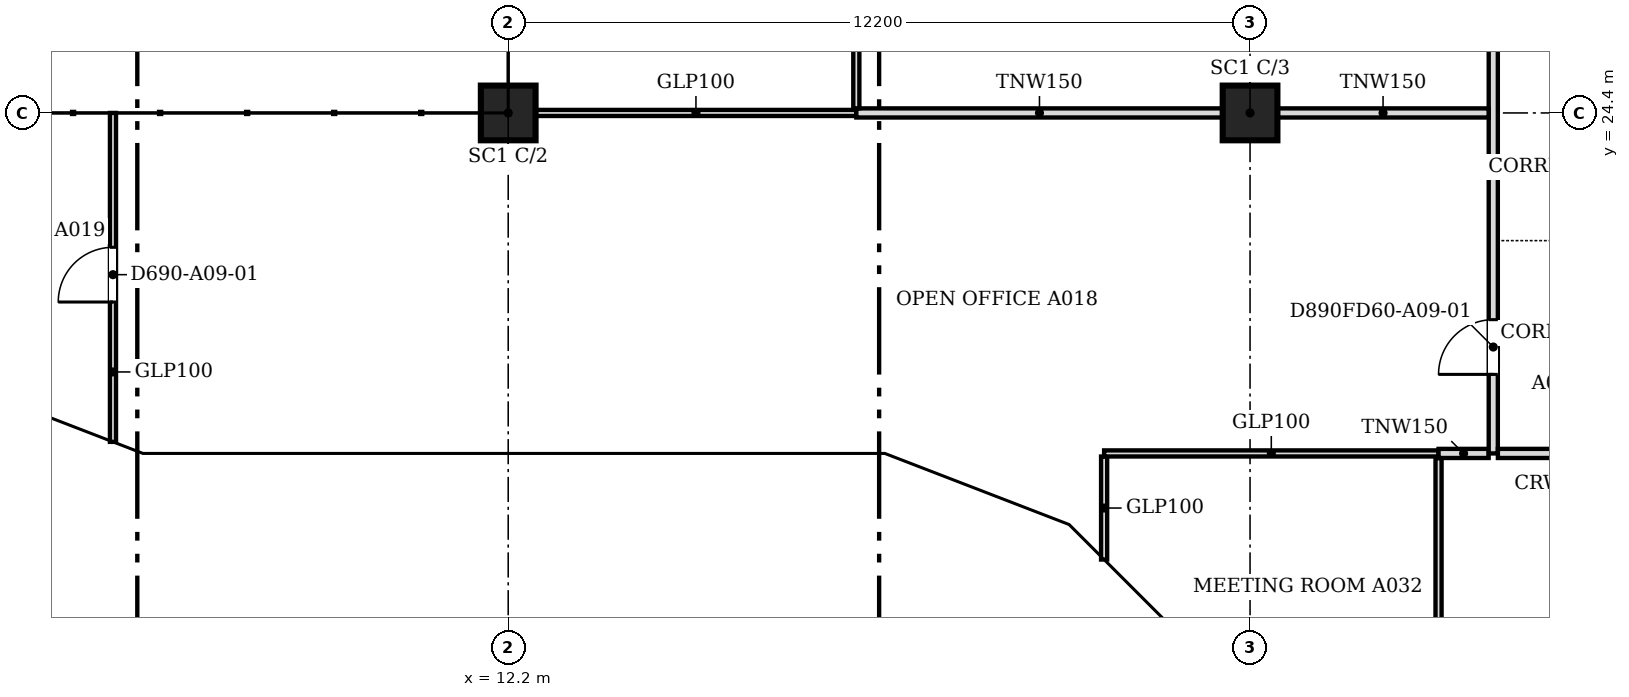
"""IFC4 building model, lengths in metres.
Left out: names, types, materials, properties, quantities, classifications, styles, units other than length and angle.
Written with IfcOpenShell. Run it as: python <this file> out.ifc"""

import sys

from ifc_helpers import new_model, si_unit, direction, frame, frame_2d, origin, origin_2d, place, context, subcontext, project, spatial, polyline, rectangle, outline, extrude, faceted_brep, source, transform, mapped, element, fill, save


model = new_model("IFC4")
c1 = context("Model", 3, precision=1e-05, world=origin(), true_north=direction((0.0, 1.0)))
c2 = subcontext(c1, "Body", "Model", "MODEL_VIEW")
j1 = project(units=[si_unit("LENGTHUNIT", "METRE"), si_unit("PLANEANGLEUNIT", "RADIAN")], contexts=[c1])
p1 = place(None, origin())
s1 = spatial("IfcSite", under=j1, at=p1, CompositionType="ELEMENT")
p2 = place(p1, origin())
s2 = spatial("IfcBuilding", under=s1, at=p2, CompositionType="ELEMENT")
p3 = place(p2, frame((0.0, 0.0, 102.8)))
s3 = spatial("IfcBuildingStorey", under=s2, at=p3, CompositionType="ELEMENT", Elevation=102.8)
for number, where, z_axis, x_axis in (
    (1, (12.2, 24.4, 0.0), (0.0, 0.0, 1.0), (1.0, 0.0, 0.0)),
    (2, (24.4, 24.4, 0.0), (0.0, 0.0, 1.0), (1.0, 0.0, 0.0)),
):
    element("IfcColumn", number, at=place(p3, frame(where, z_axis=z_axis, x_axis=x_axis)), inside=s3, PredefinedType="COLUMN", context=c2, shape_type="SweptSolid", body=[
        extrude(rectangle(XDim=0.9, YDim=0.9, at=origin_2d()), origin(), (0.0, 0.0, 1.0), 3.55),
    ])
m1 = source(origin(), c2, "Body", "Brep", [
    faceted_brep([(0.053, -0.25, 0.0), (3.003, -0.25, 3.8), (0.053, -0.25, 7.6), (0.0, -0.25, 7.532), (0.0, -0.25, 0.068), (0.106, 0.25, 7.532), (2.957, 0.25, 3.86), (2.957, 0.25, 3.74), (0.106, 0.25, 0.068), (3.003, 0.0, 3.8), (0.053, 0.0, 0.0), (0.053, 0.0, 7.6)], [[[0, 1, 2, 3, 4]], [[5, 6, 7, 8]], [[8, 7, 9, 1, 0, 10]], [[6, 5, 11, 2, 1, 9]], [[3, 2, 11]], [[10, 0, 4]], [[8, 10, 4, 3, 11, 5]], [[9, 7, 6]]]),
])
p4 = place(p3, frame((3.344, 19.631, -3.8), z_axis=(0.0, 0.0, 1.0), x_axis=(0.933007896601, -0.359855894603, 0.0)))
e3 = element("IfcWall", 3, at=p4, inside=s3, PredefinedType="SOLIDWALL", context=c2, shape_type="MappedRepresentation", body=[
    mapped(m1, transform((0.0, 0.0, 0.0), scale=1.0)),
])
m2 = source(origin(), c2, "Body", "SweptSolid", [
    extrude(outline(polyline([(0.253, 0.665), (2.687, 3.8), (0.253, 6.935), (0.253, 0.665)])), frame((0.0, 0.26, 0.0), z_axis=(0.0, -1.0, 0.0), x_axis=(1.0, 0.0, 0.0)), (0.0, 0.0, 1.0), 0.52),
])
p5 = place(p4, origin())
e4 = element("IfcOpeningElement", 4, at=p5, cuts=e3, PredefinedType="OPENING", context=c2, shape_type="MappedRepresentation", body=[
    mapped(m2, transform((0.0, 0.0, 0.0), scale=1.0)),
])
m3 = source(origin(), c2, "Body", "Brep", [
    faceted_brep([(3.003, -0.25, 0.0), (6.053, -0.25, 3.8), (3.003, -0.25, 7.6), (0.0, -0.25, 3.8), (0.047, 0.25, 3.859), (3.003, 0.25, 7.6), (6.053, 0.25, 3.8), (3.003, 0.25, 0.0), (0.047, 0.25, 3.741), (0.0, 0.0, 3.8)], [[[0, 1, 2, 3]], [[4, 5, 6, 7, 8]], [[7, 6, 1, 0]], [[6, 5, 2, 1]], [[5, 4, 9, 3, 2]], [[8, 7, 0, 3, 9]], [[8, 9, 4]]]),
])
p6 = place(p3, frame((6.146, 18.55, -3.8), z_axis=(0.0, 0.0, 1.0), x_axis=(1.0, 0.0, 0.0)))
e5 = element("IfcWall", 5, at=p6, inside=s3, PredefinedType="SOLIDWALL", context=c2, shape_type="MappedRepresentation", body=[
    mapped(m3, transform((0.0, 0.0, 0.0), scale=1.0)),
])
m4 = source(origin(), c2, "Body", "SweptSolid", [
    extrude(outline(polyline([(3.005, 0.401), (5.733, 3.8), (3.005, 7.199), (0.319, 3.8), (3.005, 0.401)])), frame((0.0, 0.26, 0.0), z_axis=(0.0, -1.0, 0.0), x_axis=(1.0, 0.0, 0.0)), (0.0, 0.0, 1.0), 0.52),
])
p7 = place(p6, origin())
e6 = element("IfcOpeningElement", 6, at=p7, cuts=e5, PredefinedType="OPENING", context=c2, shape_type="MappedRepresentation", body=[
    mapped(m4, transform((0.0, 0.0, 0.0), scale=1.0)),
])
m5 = source(origin(), c2, "Body", "Brep", [
    faceted_brep([(3.05, -0.25, 0.0), (6.1, -0.25, 3.743), (6.1, -0.25, 3.857), (3.05, -0.25, 7.6), (0.0, -0.25, 3.8), (0.0, 0.25, 3.8), (3.05, 0.25, 7.6), (6.146, 0.25, 3.8), (3.05, 0.25, 0.0), (6.146, -0.0, 3.8)], [[[0, 1, 2, 3, 4]], [[5, 6, 7, 8]], [[8, 7, 9, 1, 0]], [[7, 6, 3, 2, 9]], [[6, 5, 4, 3]], [[5, 8, 0, 4]], [[1, 9, 2]]]),
])
p8 = place(p3, frame((12.2, 18.55, -3.8), z_axis=(0.0, 0.0, 1.0), x_axis=(1.0, 0.0, 0.0)))
e7 = element("IfcWall", 7, at=p8, inside=s3, PredefinedType="SOLIDWALL", context=c2, shape_type="MappedRepresentation", body=[
    mapped(m5, transform((0.0, 0.0, 0.0), scale=1.0)),
])
m6 = source(origin(), c2, "Body", "SweptSolid", [
    extrude(outline(polyline([(3.052, 0.397), (5.824, 3.8), (3.052, 7.202), (0.321, 3.8), (3.052, 0.397)])), frame((0.0, 0.26, 0.0), z_axis=(0.0, -1.0, 0.0), x_axis=(1.0, 0.0, 0.0)), (0.0, 0.0, 1.0), 0.52),
])
p9 = place(p8, origin())
e8 = element("IfcOpeningElement", 8, at=p9, cuts=e7, PredefinedType="OPENING", context=c2, shape_type="MappedRepresentation", body=[
    mapped(m6, transform((0.0, 0.0, 0.0), scale=1.0)),
])
m7 = source(origin(), c2, "Body", "Brep", [
    faceted_brep([(3.096, -0.25, 7.536), (0.047, -0.25, 3.856), (0.047, -0.25, 3.744), (3.096, -0.25, 0.064), (0.0, 0.25, 3.8), (3.149, 0.25, 7.6), (3.202, 0.25, 7.536), (3.202, 0.25, 0.064), (3.149, 0.25, 0.0), (3.149, -0.0, 0.0), (3.149, -0.0, 7.6), (0.0, 0.0, 3.8)], [[[0, 1, 2, 3]], [[4, 5, 6, 7, 8]], [[8, 7, 9]], [[6, 5, 10]], [[5, 4, 11, 1, 0, 10]], [[4, 8, 9, 3, 2, 11]], [[11, 2, 1]], [[3, 9, 7, 6, 10, 0]]]),
])
p10 = place(p3, frame((18.346, 18.55, -3.8), z_axis=(0.0, 0.0, 1.0), x_axis=(0.932985567668, -0.359913782069, 0.0)))
e9 = element("IfcWall", 9, at=p10, inside=s3, PredefinedType="SOLIDWALL", context=c2, shape_type="MappedRepresentation", body=[
    mapped(m7, transform((0.0, 0.0, 0.0), scale=1.0)),
])
m8 = source(origin(), c2, "Body", "SweptSolid", [
    extrude(outline(polyline([(2.949, 6.967), (0.325, 3.8), (2.949, 0.633), (2.949, 6.967)])), frame((0.0, 0.26, 0.0), z_axis=(0.0, -1.0, 0.0), x_axis=(1.0, 0.0, 0.0)), (0.0, 0.0, 1.0), 0.52),
])
p11 = place(p10, origin())
e10 = element("IfcOpeningElement", 10, at=p11, cuts=e9, PredefinedType="OPENING", context=c2, shape_type="MappedRepresentation", body=[
    mapped(m8, transform((0.0, 0.0, 0.0), scale=1.0)),
])
m9 = source(origin(), c2, "Body", "Brep", [
    faceted_brep([(0.106, -0.25, 0.064), (3.156, -0.25, 3.736), (3.156, -0.25, 3.864), (0.106, -0.25, 7.536), (0.0, 0.25, 7.536), (0.053, 0.25, 7.6), (3.209, 0.25, 3.8), (0.053, 0.25, 0.0), (0.0, 0.25, 0.064), (3.209, -0.0, 3.8), (0.053, 0.0, 0.0), (0.053, 0.0, 7.6)], [[[0, 1, 2, 3]], [[4, 5, 6, 7, 8]], [[7, 6, 9, 1, 0, 10]], [[6, 5, 11, 3, 2, 9]], [[5, 4, 11]], [[8, 7, 10]], [[8, 10, 0, 3, 11, 4]], [[1, 9, 2]]]),
])
p12 = place(p3, frame((21.248, 17.454, -3.8), z_axis=(0.0, 0.0, 1.0), x_axis=(0.707106781187, -0.707106781187, 0.0)))
e11 = element("IfcWall", 11, at=p12, inside=s3, PredefinedType="SOLIDWALL", context=c2, shape_type="MappedRepresentation", body=[
    mapped(m9, transform((0.0, 0.0, 0.0), scale=1.0)),
])
m10 = source(origin(), c2, "Body", "SweptSolid", [
    extrude(outline(polyline([(0.253, 0.632), (2.884, 3.8), (0.253, 6.968), (0.253, 0.632)])), frame((0.0, 0.26, 0.0), z_axis=(0.0, -1.0, 0.0), x_axis=(1.0, 0.0, 0.0)), (0.0, 0.0, 1.0), 0.52),
])
p13 = place(p12, origin())
e12 = element("IfcOpeningElement", 12, at=p13, cuts=e11, PredefinedType="OPENING", context=c2, shape_type="MappedRepresentation", body=[
    mapped(m10, transform((0.0, 0.0, 0.0), scale=1.0)),
])
m11 = source(origin(), c2, "Body", "Brep", [
    faceted_brep([(2.95, -0.25, 0.0), (2.997, -0.25, 0.059), (2.997, -0.25, 3.8), (0.0, -0.25, 3.8), (0.053, 0.25, 3.8), (2.904, 0.25, 3.8), (2.904, 0.25, 0.06), (0.053, 0.25, 3.732), (2.95, 0.0, 0.0), (0.0, 0.0, 3.8)], [[[0, 1, 2, 3]], [[4, 5, 6, 7]], [[1, 0, 8]], [[5, 4, 9, 3, 2]], [[7, 6, 8, 0, 3, 9]], [[7, 9, 4]], [[1, 8, 6, 5, 2]]]),
])
p14 = place(p3, frame((3.394, 19.612, 0.0), z_axis=(0.0, 0.0, 1.0), x_axis=(0.932990326376, -0.359901446078, 0.0)))
e13 = element("IfcWall", 13, at=p14, inside=s3, PredefinedType="SOLIDWALL", context=c2, shape_type="MappedRepresentation", body=[
    mapped(m11, transform((0.0, 0.0, 0.0), scale=1.0)),
])
m12 = source(origin(), c2, "Body", "SweptSolid", [
    extrude(outline(polyline([(2.75, 3.55), (0.511, 3.55), (2.75, 0.665), (2.75, 3.55)])), frame((0.0, 0.26, 0.0), z_axis=(0.0, -1.0, 0.0), x_axis=(1.0, 0.0, 0.0)), (0.0, 0.0, 1.0), 0.52),
])
p15 = place(p14, origin())
e14 = element("IfcOpeningElement", 14, at=p15, cuts=e13, PredefinedType="OPENING", context=c2, shape_type="MappedRepresentation", body=[
    mapped(m12, transform((0.0, 0.0, 0.0), scale=1.0)),
])
m13 = source(origin(), c2, "Body", "Brep", [
    faceted_brep([(0.047, -0.25, 0.0), (3.05, -0.25, 3.8), (0.0, -0.25, 3.8), (0.0, -0.25, 0.06), (0.093, 0.25, 3.8), (3.05, 0.25, 3.8), (0.093, 0.25, 0.059), (0.047, 0.0, 0.0)], [[[0, 1, 2, 3]], [[4, 5, 6]], [[6, 5, 1, 0, 7]], [[5, 4, 2, 1]], [[7, 0, 3]], [[6, 7, 3, 2, 4]]]),
])
p16 = place(p3, frame((6.1, 18.55, 0.0), z_axis=(0.0, 0.0, 1.0), x_axis=(1.0, 0.0, 0.0)))
e15 = element("IfcWall", 15, at=p16, inside=s3, PredefinedType="SOLIDWALL", context=c2, shape_type="MappedRepresentation", body=[
    mapped(m13, transform((0.0, 0.0, 0.0), scale=1.0)),
])
m14 = source(origin(), c2, "Body", "SweptSolid", [
    extrude(outline(polyline([(0.247, 0.656), (2.534, 3.55), (0.247, 3.55), (0.247, 0.656)])), frame((0.0, 0.26, 0.0), z_axis=(0.0, -1.0, 0.0), x_axis=(1.0, 0.0, 0.0)), (0.0, 0.0, 1.0), 0.52),
])
p17 = place(p16, origin())
e16 = element("IfcOpeningElement", 16, at=p17, cuts=e15, PredefinedType="OPENING", context=c2, shape_type="MappedRepresentation", body=[
    mapped(m14, transform((0.0, 0.0, 0.0), scale=1.0)),
])
m15 = source(origin(), c2, "Body", "SweptSolid", [
    extrude(outline(polyline([(3.05, 0.0), (6.1, 3.8), (0.0, 3.8), (3.05, 0.0)])), frame((0.0, 0.25, 0.0), z_axis=(0.0, -1.0, 0.0), x_axis=(1.0, 0.0, 0.0)), (0.0, 0.0, 1.0), 0.5),
])
p18 = place(p3, frame((9.15, 18.55, 0.0), z_axis=(0.0, 0.0, 1.0), x_axis=(1.0, 0.0, 0.0)))
e17 = element("IfcWall", 17, at=p18, inside=s3, PredefinedType="SOLIDWALL", context=c2, shape_type="MappedRepresentation", body=[
    mapped(m15, transform((0.0, 0.0, 0.0), scale=1.0)),
])
m16 = source(origin(), c2, "Body", "SweptSolid", [
    extrude(outline(polyline([(3.05, 0.399), (5.579, 3.55), (0.521, 3.55), (3.05, 0.399)])), frame((0.0, 0.26, 0.0), z_axis=(0.0, -1.0, 0.0), x_axis=(1.0, 0.0, 0.0)), (0.0, 0.0, 1.0), 0.52),
])
p19 = place(p18, origin())
e18 = element("IfcOpeningElement", 18, at=p19, cuts=e17, PredefinedType="OPENING", context=c2, shape_type="MappedRepresentation", body=[
    mapped(m16, transform((0.0, 0.0, 0.0), scale=1.0)),
])
m17 = source(origin(), c2, "Body", "Brep", [
    faceted_brep([(3.05, -0.25, 3.8), (0.0, -0.25, 3.8), (3.05, -0.25, 0.057), (0.0, 0.25, 3.8), (3.143, 0.25, 3.8), (3.143, 0.25, 0.056), (3.096, 0.25, 0.0), (3.096, -0.0, 0.0)], [[[0, 1, 2]], [[3, 4, 5, 6]], [[6, 5, 7]], [[4, 3, 1, 0]], [[3, 6, 7, 2, 1]], [[2, 7, 5, 4, 0]]]),
])
p20 = place(p3, frame((15.25, 18.55, 0.0), z_axis=(0.0, 0.0, 1.0), x_axis=(1.0, 0.0, 0.0)))
e19 = element("IfcWall", 19, at=p20, inside=s3, PredefinedType="SOLIDWALL", context=c2, shape_type="MappedRepresentation", body=[
    mapped(m17, transform((0.0, 0.0, 0.0), scale=1.0)),
])
m18 = source(origin(), c2, "Body", "SweptSolid", [
    extrude(outline(polyline([(2.896, 3.55), (0.526, 3.55), (2.896, 0.641), (2.896, 3.55)])), frame((0.0, 0.26, 0.0), z_axis=(0.0, -1.0, 0.0), x_axis=(1.0, 0.0, 0.0)), (0.0, 0.0, 1.0), 0.52),
])
p21 = place(p20, origin())
e20 = element("IfcOpeningElement", 20, at=p21, cuts=e19, PredefinedType="OPENING", context=c2, shape_type="MappedRepresentation", body=[
    mapped(m18, transform((0.0, 0.0, 0.0), scale=1.0)),
])
m19 = source(origin(), c2, "Body", "Brep", [
    faceted_brep([(0.093, -0.25, 0.056), (3.143, -0.25, 3.736), (3.143, -0.25, 3.8), (0.093, -0.25, 3.8), (0.0, 0.25, 3.8), (3.196, 0.25, 3.8), (0.047, 0.25, 0.0), (0.0, 0.25, 0.057), (3.196, -0.0, 3.8), (0.047, 0.0, 0.0)], [[[0, 1, 2, 3]], [[4, 5, 6, 7]], [[6, 5, 8, 1, 0, 9]], [[5, 4, 3, 2, 8]], [[7, 6, 9]], [[7, 9, 0, 3, 4]], [[1, 8, 2]]]),
])
p22 = place(p3, frame((18.303, 18.567, 0.0), z_axis=(0.0, 0.0, 1.0), x_axis=(0.932978940178, -0.359930961693, 0.0)))
e21 = element("IfcWall", 21, at=p22, inside=s3, PredefinedType="SOLIDWALL", context=c2, shape_type="MappedRepresentation", body=[
    mapped(m19, transform((0.0, 0.0, 0.0), scale=1.0)),
])
m20 = source(origin(), c2, "Body", "SweptSolid", [
    extrude(outline(polyline([(0.247, 0.633), (2.664, 3.55), (0.247, 3.55), (0.247, 0.633)])), frame((0.0, 0.26, 0.0), z_axis=(0.0, -1.0, 0.0), x_axis=(1.0, 0.0, 0.0)), (0.0, 0.0, 1.0), 0.52),
])
p23 = place(p22, origin())
e22 = element("IfcOpeningElement", 22, at=p23, cuts=e21, PredefinedType="OPENING", context=c2, shape_type="MappedRepresentation", body=[
    mapped(m20, transform((0.0, 0.0, 0.0), scale=1.0)),
])
m21 = source(origin(), c2, "Body", "Brep", [
    faceted_brep([(3.103, -0.25, 3.8), (0.053, -0.25, 3.8), (0.053, -0.25, 3.736), (3.103, -0.25, 0.064), (0.0, 0.25, 3.8), (3.209, 0.25, 3.8), (3.209, 0.25, 0.064), (3.156, 0.25, 0.0), (3.156, -0.0, 0.0), (0.0, 0.0, 3.8)], [[[0, 1, 2, 3]], [[4, 5, 6, 7]], [[7, 6, 8]], [[5, 4, 9, 1, 0]], [[4, 7, 8, 3, 2, 9]], [[2, 1, 9]], [[3, 8, 6, 5, 0]]]),
])
p24 = place(p3, frame((21.285, 17.417, 0.0), z_axis=(0.0, 0.0, 1.0), x_axis=(0.707106781187, -0.707106781187, 0.0)))
e23 = element("IfcWall", 23, at=p24, inside=s3, PredefinedType="SOLIDWALL", context=c2, shape_type="MappedRepresentation", body=[
    mapped(m21, transform((0.0, 0.0, 0.0), scale=1.0)),
])
m22 = source(origin(), c2, "Body", "SweptSolid", [
    extrude(outline(polyline([(2.956, 3.55), (0.533, 3.55), (2.956, 0.632), (2.956, 3.55)])), frame((0.0, 0.26, 0.0), z_axis=(0.0, -1.0, 0.0), x_axis=(1.0, 0.0, 0.0)), (0.0, 0.0, 1.0), 0.52),
])
p25 = place(p24, origin())
e24 = element("IfcOpeningElement", 24, at=p25, cuts=e23, PredefinedType="OPENING", context=c2, shape_type="MappedRepresentation", body=[
    mapped(m22, transform((0.0, 0.0, 0.0), scale=1.0)),
])
p26 = place(p3, frame((27.5, 10.276, 0.0), z_axis=(0.0, 0.0, 1.0), x_axis=(0.0, 1.0, 0.0)))
e25 = element("IfcWall", 25, at=p26, inside=s3, PredefinedType="PARTITIONING", context=c2, shape_type="SweptSolid", body=[
    extrude(rectangle(XDim=8.448, YDim=0.1, at=frame_2d((4.224, 0.0))), origin(), (0.0, 0.0, 1.0), 2.715),
])
m23 = source(origin(), c2, "Body", "SweptSolid", [
    extrude(rectangle(XDim=0.9, YDim=2.1, at=frame_2d((0.45, 1.05))), frame((0.0, 0.06, 0.0), z_axis=(0.0, -1.0, 0.0), x_axis=(1.0, 0.0, 0.0)), (0.0, 0.0, 1.0), 0.12),
])
p27 = place(p26, frame((3.8, 0.0, 0.0)))
e26 = element("IfcOpeningElement", 26, at=p27, cuts=e25, PredefinedType="OPENING", context=c2, shape_type="MappedRepresentation", body=[
    mapped(m23, transform((0.0, 0.0, 0.0), scale=1.0)),
])
p28 = place(p3, frame((22.0, 17.055, 0.0), z_axis=(0.0, 0.0, 1.0), x_axis=(0.0, 1.0, 0.0)))
e27 = element("IfcWall", 27, at=p28, inside=s3, PredefinedType="PARTITIONING", context=c2, shape_type="SweptSolid", body=[
    extrude(rectangle(XDim=1.694, YDim=0.1, at=frame_2d((0.847, 0.0))), origin(), (0.0, 0.0, 1.0), 2.715),
])
p29 = place(p3, frame((22.0, 18.8, 0.0), z_axis=(0.0, 0.0, 1.0), x_axis=(1.0, 0.0, 0.0)))
e28 = element("IfcWall", 28, at=p29, inside=s3, PredefinedType="PARTITIONING", context=c2, shape_type="SweptSolid", body=[
    extrude(rectangle(XDim=5.499, YDim=0.1, at=frame_2d((2.75, 0.0))), origin(), (0.0, 0.0, 1.0), 2.715),
])
p30 = place(p3, frame((27.5, 18.8, 0.0), z_axis=(0.0, 0.0, 1.0), x_axis=(1.0, 0.0, 0.0)))
e29 = element("IfcWall", 29, at=p30, inside=s3, PredefinedType="PARTITIONING", context=c2, shape_type="SweptSolid", body=[
    extrude(rectangle(XDim=0.824, YDim=0.15, at=frame_2d((0.412, 0.0))), origin(), (0.0, 0.0, 1.0), 2.715),
])
p31 = place(p3, frame((28.4, 18.8, 0.0), z_axis=(0.0, 0.0, 1.0), x_axis=(0.0, 1.0, 0.0)))
e30 = element("IfcWall", 30, at=p31, inside=s3, PredefinedType="PARTITIONING", context=c2, shape_type="SweptSolid", body=[
    extrude(rectangle(XDim=26.824, YDim=0.15, at=frame_2d((13.412, 0.0))), origin(), (0.0, 0.0, 1.0), 2.715),
])
m24 = source(origin(), c2, "Body", "SweptSolid", [
    extrude(rectangle(XDim=0.9, YDim=2.1, at=frame_2d((0.45, 1.05))), frame((0.0, 0.085, 0.0), z_axis=(0.0, -1.0, 0.0), x_axis=(1.0, 0.0, 0.0)), (0.0, 0.0, 1.0), 0.17),
])
p32 = place(p31, frame((1.3, 0.0, 0.0)))
e31 = element("IfcOpeningElement", 31, at=p32, cuts=e30, PredefinedType="OPENING", context=c2, shape_type="MappedRepresentation", body=[
    mapped(m24, transform((0.0, 0.0, 0.0), scale=1.0)),
])
m25 = source(origin(), c2, "Body", "SweptSolid", [
    extrude(rectangle(XDim=1.0, YDim=2.1, at=frame_2d((0.5, 1.05))), frame((0.0, 0.085, 0.0), z_axis=(0.0, -1.0, 0.0), x_axis=(1.0, 0.0, 0.0)), (0.0, 0.0, 1.0), 0.17),
])
p33 = place(p31, frame((23.351, 0.0, 0.0)))
e32 = element("IfcOpeningElement", 32, at=p33, cuts=e30, PredefinedType="OPENING", context=c2, shape_type="MappedRepresentation", body=[
    mapped(m25, transform((0.0, 0.0, 0.0), scale=1.0)),
])
p34 = place(p31, frame((8.2, 0.0, 0.0)))
e33 = element("IfcOpeningElement", 33, at=p34, cuts=e30, PredefinedType="OPENING", context=c2, shape_type="MappedRepresentation", body=[
    mapped(m24, transform((0.0, 0.0, 0.0), scale=1.0)),
])
p35 = place(p31, frame((15.8, 0.0, 0.0)))
e34 = element("IfcOpeningElement", 34, at=p35, cuts=e30, PredefinedType="OPENING", context=c2, shape_type="MappedRepresentation", body=[
    mapped(m25, transform((0.0, 0.0, 0.0), scale=1.0)),
])
p36 = place(p3, frame((28.476, 18.8, 0.0), z_axis=(0.0, 0.0, 1.0), x_axis=(1.0, 0.0, 0.0)))
e35 = element("IfcWall", 35, at=p36, inside=s3, PredefinedType="PARTITIONING", context=c2, shape_type="SweptSolid", body=[
    extrude(rectangle(XDim=1.948, YDim=0.15, at=frame_2d((0.974, 0.0))), origin(), (0.0, 0.0, 1.0), 2.715),
])
p37 = place(p3, frame((5.7, 18.99, 0.0), z_axis=(0.0, 0.0, 1.0), x_axis=(0.0, 1.0, 0.0)))
e36 = element("IfcWall", 36, at=p37, inside=s3, PredefinedType="PARTITIONING", context=c2, shape_type="SweptSolid", body=[
    extrude(rectangle(XDim=5.41, YDim=0.1, at=frame_2d((2.705, 0.0))), origin(), (0.0, 0.0, 1.0), 2.715),
])
p38 = place(p37, frame((2.3, 0.0, 0.0)))
e37 = element("IfcOpeningElement", 37, at=p38, cuts=e36, PredefinedType="OPENING", context=c2, shape_type="MappedRepresentation", body=[
    mapped(m23, transform((0.0, 0.0, 0.0), scale=1.0)),
])
p39 = place(p3, frame((12.651, 24.4, 0.0), z_axis=(0.0, 0.0, 1.0), x_axis=(1.0, 0.0, 0.0)))
e38 = element("IfcWall", 38, at=p39, inside=s3, PredefinedType="PARTITIONING", context=c2, shape_type="SweptSolid", body=[
    extrude(rectangle(XDim=5.273, YDim=0.1, at=frame_2d((2.637, 0.0))), origin(), (0.0, 0.0, 1.0), 2.715),
])
p40 = place(p3, frame((17.925, 24.4, 0.0), z_axis=(0.0, 0.0, 1.0), x_axis=(1.0, 0.0, 0.0)))
e39 = element("IfcWall", 39, at=p40, inside=s3, PredefinedType="PARTITIONING", context=c2, shape_type="SweptSolid", body=[
    extrude(rectangle(XDim=6.024, YDim=0.15, at=frame_2d((3.012, 0.0))), origin(), (0.0, 0.0, 1.0), 2.715),
])
p41 = place(p3, frame((24.851, 24.4, 0.0), z_axis=(0.0, 0.0, 1.0), x_axis=(1.0, 0.0, 0.0)))
e40 = element("IfcWall", 40, at=p41, inside=s3, PredefinedType="PARTITIONING", context=c2, shape_type="SweptSolid", body=[
    extrude(rectangle(XDim=3.473, YDim=0.15, at=frame_2d((1.736, 0.0))), origin(), (0.0, 0.0, 1.0), 2.715),
])
p42 = place(p3, frame((17.925, 24.476, 0.0), z_axis=(0.0, 0.0, 1.0), x_axis=(0.0, 1.0, 0.0)))
e41 = element("IfcWall", 41, at=p42, inside=s3, PredefinedType="PARTITIONING", context=c2, shape_type="SweptSolid", body=[
    extrude(rectangle(XDim=5.948, YDim=0.1, at=frame_2d((2.974, 0.0))), origin(), (0.0, 0.0, 1.0), 2.715),
])
p43 = place(p42, frame((2.5, 0.0, 0.0)))
e42 = element("IfcOpeningElement", 42, at=p43, cuts=e41, PredefinedType="OPENING", context=c2, shape_type="MappedRepresentation", body=[
    mapped(m23, transform((0.0, 0.0, 0.0), scale=1.0)),
])
m26 = source(origin(), c2, "Body", "SweptSolid", [
    extrude(rectangle(XDim=0.9, YDim=2.1, at=frame_2d((0.45, 1.05))), frame((0.0, 0.025, 0.0), z_axis=(0.0, -1.0, 0.0), x_axis=(1.0, 0.0, 0.0)), (0.0, 0.0, 1.0), 0.05),
])
p44 = place(p32, origin())
e43 = element("IfcDoor", 43, at=p44, inside=s3, OperationType="SINGLE_SWING_LEFT", PredefinedType="DOOR", context=c2, shape_type="MappedRepresentation", body=[
    mapped(m26, transform((0.0, 0.0, 0.0), scale=1.0)),
])
fill(e31, e43)
p45 = place(p38, origin())
e44 = element("IfcDoor", 44, at=p45, inside=s3, OperationType="SINGLE_SWING_LEFT", PredefinedType="DOOR", context=c2, shape_type="MappedRepresentation", body=[
    mapped(m26, transform((0.0, 0.0, 0.0), scale=1.0)),
])
fill(e37, e44)
save(model, sys.argv[1])
